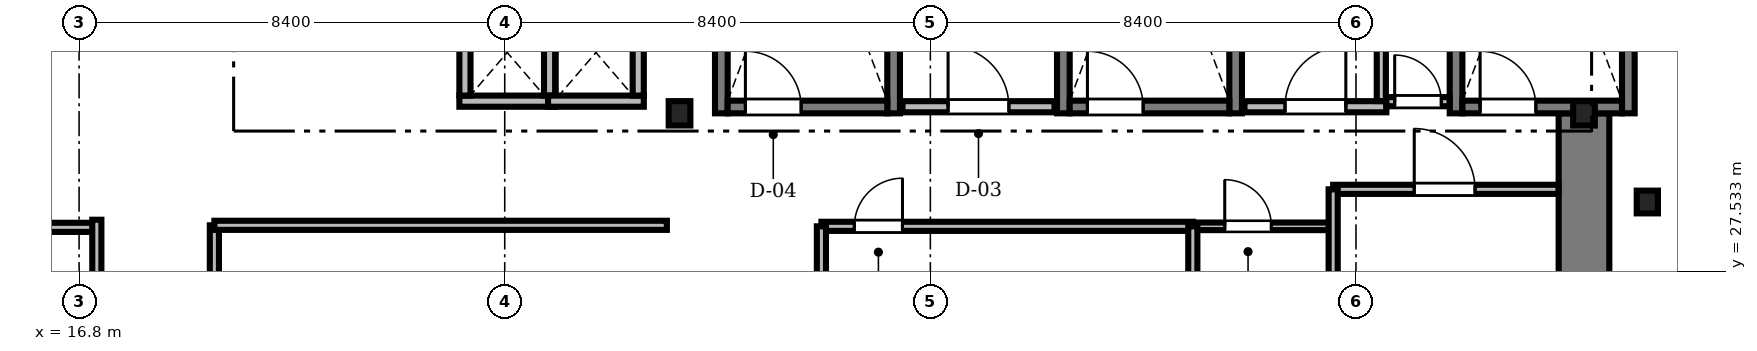
"""IFC4 building model, lengths in metres.
Left out: names, types, materials, properties, quantities, classifications, styles, units other than length and angle.
Written with IfcOpenShell. Run it as: python <this file> out.ifc"""

import sys

from ifc_helpers import new_model, si_unit, direction, frame, frame_2d, origin, origin_2d, place, context, subcontext, project, spatial, rectangle, i_section, extrude, source, transform, mapped, element, fill, save


model = new_model("IFC4")
c1 = context("Model", 3, precision=1e-05, world=origin(), true_north=direction((0.0, 1.0)))
c2 = subcontext(c1, "Body", "Model", "MODEL_VIEW")
j1 = project(units=[si_unit("LENGTHUNIT", "METRE"), si_unit("PLANEANGLEUNIT", "RADIAN")], contexts=[c1])
p1 = place(None, origin())
s1 = spatial("IfcSite", under=j1, at=p1, CompositionType="ELEMENT")
p2 = place(p1, origin())
s2 = spatial("IfcBuilding", under=s1, at=p2, CompositionType="ELEMENT")
p3 = place(p2, frame((0.0, 0.0, 82.35)))
s3 = spatial("IfcBuildingStorey", under=s2, at=p3, CompositionType="ELEMENT", Elevation=82.35)
m1 = source(origin(), c2, "Body", "SweptSolid", [
    extrude(rectangle(XDim=13.15, YDim=1.0, at=frame_2d((6.575, 0.0))), origin(), (0.0, 0.0, 1.0), 3.41),
])
p4 = place(p3, frame((46.5, 17.5, 0.0), z_axis=(0.0, 0.0, 1.0), x_axis=(0.0, 1.0, 0.0)))
e1 = element("IfcWall", 1, at=p4, inside=s3, PredefinedType="SHEAR", context=c2, shape_type="MappedRepresentation", body=[
    mapped(m1, transform((0.0, 0.0, 0.0), scale=1.0)),
])
m2 = source(origin(), c2, "Body", "SweptSolid", [
    extrude(i_section(OverallWidth=0.428, OverallDepth=0.481, WebThickness=0.04, FlangeThickness=0.063, FilletRadius=0.015, at=origin_2d()), origin(), (0.0, 0.0, 1.0), 3.41),
])
for number, where, z_axis, x_axis in (
    (2, (28.65, 30.65, 0.0), (0.0, 0.0, 1.0), (1.0, 0.0, 0.0)),
    (3, (46.5, 30.65, 0.0), (0.0, 0.0, 1.0), (1.0, 0.0, 0.0)),
):
    element("IfcColumn", number, at=place(p3, frame(where, z_axis=z_axis, x_axis=x_axis)), inside=s3, PredefinedType="COLUMN", context=c2, shape_type="MappedRepresentation", body=[
        mapped(m2, transform((0.0, 0.0, 0.0), scale=1.0)),
    ])
m3 = source(origin(), c2, "Body", "SweptSolid", [
    extrude(i_section(OverallWidth=0.419, OverallDepth=0.449, WebThickness=0.031, FlangeThickness=0.048, FilletRadius=0.015, at=origin_2d()), origin(), (0.0, 0.0, 1.0), 3.41),
])
p5 = place(p3, frame((47.75, 28.9, 0.0), z_axis=(0.0, 0.0, 1.0), x_axis=(1.0, 0.0, 0.0)))
e4 = element("IfcColumn", 4, at=p5, inside=s3, PredefinedType="COLUMN", context=c2, shape_type="MappedRepresentation", body=[
    mapped(m3, transform((0.0, 0.0, 0.0), scale=1.0)),
])
m4 = source(origin(), c2, "Body", "SweptSolid", [
    extrude(rectangle(XDim=9.15, YDim=0.25, at=frame_2d((4.575, 0.0))), origin(), (0.0, 0.0, 1.0), 3.45),
])
for number, where, z_axis, x_axis in (
    (5, (29.475, 30.65, 0.0), (0.0, 0.0, 1.0), (0.0, 1.0, 0.0)),
    (6, (32.875, 30.65, 0.0), (0.0, 0.0, 1.0), (0.0, 1.0, 0.0)),
):
    element("IfcWall", number, at=place(p3, frame(where, z_axis=z_axis, x_axis=x_axis)), inside=s3, PredefinedType="SOLIDWALL", context=c2, shape_type="MappedRepresentation", body=[
        mapped(m4, transform((0.0, 0.0, 0.0), scale=1.0)),
    ])
m5 = source(origin(), c2, "Body", "SweptSolid", [
    extrude(rectangle(XDim=3.15, YDim=0.25, at=frame_2d((1.575, 0.0))), origin(), (0.0, 0.0, 1.0), 3.45),
])
p6 = place(p3, frame((29.6, 30.775, 0.0), z_axis=(0.0, 0.0, 1.0), x_axis=(1.0, 0.0, 0.0)))
e7 = element("IfcWall", 7, at=p6, inside=s3, PredefinedType="SOLIDWALL", context=c2, shape_type="MappedRepresentation", body=[
    mapped(m5, transform((0.0, 0.0, 0.0), scale=1.0)),
])
m6 = source(origin(), c2, "Body", "SweptSolid", [
    extrude(rectangle(XDim=1.1, YDim=2.2, at=frame_2d((0.55, 1.1))), frame((0.0, 0.135, 0.0), z_axis=(0.0, -1.0, 0.0), x_axis=(1.0, 0.0, 0.0)), (0.0, 0.0, 1.0), 0.27),
])
p7 = place(p6, frame((0.35, 0.0, 0.0)))
e8 = element("IfcOpeningElement", 8, at=p7, cuts=e7, PredefinedType="OPENING", context=c2, shape_type="MappedRepresentation", body=[
    mapped(m6, transform((0.0, 0.0, 0.0), scale=1.0)),
])
for number, where, z_axis, x_axis in (
    (9, (36.225, 30.65, 0.0), (0.0, 0.0, 1.0), (0.0, 1.0, 0.0)),
    (10, (39.625, 30.65, 0.0), (0.0, 0.0, 1.0), (0.0, 1.0, 0.0)),
):
    element("IfcWall", number, at=place(p3, frame(where, z_axis=z_axis, x_axis=x_axis)), inside=s3, PredefinedType="SOLIDWALL", context=c2, shape_type="MappedRepresentation", body=[
        mapped(m4, transform((0.0, 0.0, 0.0), scale=1.0)),
    ])
p8 = place(p3, frame((36.35, 30.775, 0.0), z_axis=(0.0, 0.0, 1.0), x_axis=(1.0, 0.0, 0.0)))
e11 = element("IfcWall", 11, at=p8, inside=s3, PredefinedType="SOLIDWALL", context=c2, shape_type="MappedRepresentation", body=[
    mapped(m5, transform((0.0, 0.0, 0.0), scale=1.0)),
])
p9 = place(p8, frame((0.35, 0.0, 0.0)))
e12 = element("IfcOpeningElement", 12, at=p9, cuts=e11, PredefinedType="OPENING", context=c2, shape_type="MappedRepresentation", body=[
    mapped(m6, transform((0.0, 0.0, 0.0), scale=1.0)),
])
for number, where, z_axis, x_axis in (
    (13, (43.975, 30.65, 0.0), (0.0, 0.0, 1.0), (0.0, 1.0, 0.0)),
    (14, (47.375, 30.65, 0.0), (0.0, 0.0, 1.0), (0.0, 1.0, 0.0)),
):
    element("IfcWall", number, at=place(p3, frame(where, z_axis=z_axis, x_axis=x_axis)), inside=s3, PredefinedType="SOLIDWALL", context=c2, shape_type="MappedRepresentation", body=[
        mapped(m4, transform((0.0, 0.0, 0.0), scale=1.0)),
    ])
p10 = place(p3, frame((44.1, 30.775, 0.0), z_axis=(0.0, 0.0, 1.0), x_axis=(1.0, 0.0, 0.0)))
e15 = element("IfcWall", 15, at=p10, inside=s3, PredefinedType="SOLIDWALL", context=c2, shape_type="MappedRepresentation", body=[
    mapped(m5, transform((0.0, 0.0, 0.0), scale=1.0)),
])
p11 = place(p10, frame((0.35, 0.0, 0.0)))
e16 = element("IfcOpeningElement", 16, at=p11, cuts=e15, PredefinedType="OPENING", context=c2, shape_type="MappedRepresentation", body=[
    mapped(m6, transform((0.0, 0.0, 0.0), scale=1.0)),
])
m7 = source(origin(), c2, "Body", "SweptSolid", [
    extrude(rectangle(XDim=3.0, YDim=0.22, at=frame_2d((1.5, 0.0))), origin(), (0.0, 0.0, 1.0), 3.41),
])
p12 = place(p3, frame((33.05, 30.78, 0.0), z_axis=(0.0, 0.0, 1.0), x_axis=(1.0, 0.0, 0.0)))
e17 = element("IfcWall", 17, at=p12, inside=s3, PredefinedType="SOLIDWALL", context=c2, shape_type="MappedRepresentation", body=[
    mapped(m7, transform((0.0, 0.0, 0.0), scale=1.0)),
])
m8 = source(origin(), c2, "Body", "SweptSolid", [
    extrude(rectangle(XDim=1.2, YDim=2.2, at=frame_2d((0.6, 1.1))), frame((0.0, 0.12, 0.0), z_axis=(0.0, -1.0, 0.0), x_axis=(1.0, 0.0, 0.0)), (0.0, 0.0, 1.0), 0.24),
])
p13 = place(p12, frame((0.9, 0.0, 0.0)))
e18 = element("IfcOpeningElement", 18, at=p13, cuts=e17, PredefinedType="OPENING", context=c2, shape_type="MappedRepresentation", body=[
    mapped(m8, transform((0.0, 0.0, 0.0), scale=1.0)),
])
m9 = source(origin(), c2, "Body", "SweptSolid", [
    extrude(rectangle(XDim=2.8, YDim=0.22, at=frame_2d((1.4, 0.0))), origin(), (0.0, 0.0, 1.0), 3.41),
])
p14 = place(p3, frame((39.8, 30.78, 0.0), z_axis=(0.0, 0.0, 1.0), x_axis=(1.0, 0.0, 0.0)))
e19 = element("IfcWall", 19, at=p14, inside=s3, PredefinedType="SOLIDWALL", context=c2, shape_type="MappedRepresentation", body=[
    mapped(m9, transform((0.0, 0.0, 0.0), scale=1.0)),
])
p15 = place(p14, frame((0.8, 0.0, 0.0)))
e20 = element("IfcOpeningElement", 20, at=p15, cuts=e19, PredefinedType="OPENING", context=c2, shape_type="MappedRepresentation", body=[
    mapped(m8, transform((0.0, 0.0, 0.0), scale=1.0)),
])
m10 = source(origin(), c2, "Body", "SweptSolid", [
    extrude(rectangle(XDim=1.89, YDim=0.22, at=frame_2d((0.945, 0.0))), origin(), (0.0, 0.0, 1.0), 3.41),
])
p16 = place(p3, frame((24.305, 30.89, 0.0), z_axis=(0.0, 0.0, 1.0), x_axis=(1.0, 0.0, 0.0)))
e21 = element("IfcWall", 21, at=p16, inside=s3, PredefinedType="SOLIDWALL", context=c2, shape_type="MappedRepresentation", body=[
    mapped(m10, transform((0.0, 0.0, 0.0), scale=1.0)),
])
m11 = source(origin(), c2, "Body", "SweptSolid", [
    extrude(rectangle(XDim=1.7, YDim=0.22, at=frame_2d((0.85, 0.0))), origin(), (0.0, 0.0, 1.0), 3.41),
])
for number, where, z_axis, x_axis in (
    (22, (24.415, 31.0, 0.0), (0.0, 0.0, 1.0), (0.0, 1.0, 0.0)),
    (23, (26.085, 31.0, 0.0), (0.0, 0.0, 1.0), (0.0, 1.0, 0.0)),
):
    element("IfcWall", number, at=place(p3, frame(where, z_axis=z_axis, x_axis=x_axis)), inside=s3, PredefinedType="SOLIDWALL", context=c2, shape_type="MappedRepresentation", body=[
        mapped(m11, transform((0.0, 0.0, 0.0), scale=1.0)),
    ])
p17 = place(p3, frame((26.055, 30.89, 0.0), z_axis=(0.0, 0.0, 1.0), x_axis=(1.0, 0.0, 0.0)))
e24 = element("IfcWall", 24, at=p17, inside=s3, PredefinedType="SOLIDWALL", context=c2, shape_type="MappedRepresentation", body=[
    mapped(m10, transform((0.0, 0.0, 0.0), scale=1.0)),
])
p18 = place(p3, frame((27.835, 31.0, 0.0), z_axis=(0.0, 0.0, 1.0), x_axis=(0.0, 1.0, 0.0)))
e25 = element("IfcWall", 25, at=p18, inside=s3, PredefinedType="SOLIDWALL", context=c2, shape_type="MappedRepresentation", body=[
    mapped(m11, transform((0.0, 0.0, 0.0), scale=1.0)),
])
m12 = source(origin(), c2, "Body", "SweptSolid", [
    extrude(rectangle(XDim=11.94, YDim=0.18, at=frame_2d((5.97, 0.0))), origin(), (0.0, 0.0, 1.0), 2.802),
])
p19 = place(p3, frame((19.47, 16.5, 0.0), z_axis=(0.0, 0.0, 1.0), x_axis=(0.0, 1.0, 0.0)))
e26 = element("IfcWall", 26, at=p19, inside=s3, PredefinedType="PARTITIONING", context=c2, shape_type="MappedRepresentation", body=[
    mapped(m12, transform((0.0, 0.0, 0.0), scale=1.0)),
])
m13 = source(origin(), c2, "Body", "SweptSolid", [
    extrude(rectangle(XDim=1.05, YDim=2.2, at=frame_2d((0.525, 1.1))), frame((0.0, 0.1, 0.0), z_axis=(0.0, -1.0, 0.0), x_axis=(1.0, 0.0, 0.0)), (0.0, 0.0, 1.0), 0.2),
])
p20 = place(p19, frame((4.5, 0.0, 0.0)))
e27 = element("IfcOpeningElement", 27, at=p20, cuts=e26, PredefinedType="OPENING", context=c2, shape_type="MappedRepresentation", body=[
    mapped(m13, transform((0.0, 0.0, 0.0), scale=1.0)),
])
m14 = source(origin(), c2, "Body", "SweptSolid", [
    extrude(rectangle(XDim=7.33, YDim=0.18, at=frame_2d((3.665, 0.0))), origin(), (0.0, 0.0, 1.0), 3.042),
])
p21 = place(p3, frame((31.45, 28.42, 0.0), z_axis=(0.0, 0.0, 1.0), x_axis=(1.0, 0.0, 0.0)))
e28 = element("IfcWall", 28, at=p21, inside=s3, PredefinedType="PARTITIONING", context=c2, shape_type="MappedRepresentation", body=[
    mapped(m14, transform((0.0, 0.0, 0.0), scale=1.0)),
])
m15 = source(origin(), c2, "Body", "SweptSolid", [
    extrude(rectangle(XDim=0.95, YDim=2.15, at=frame_2d((0.475, 1.075))), frame((0.0, 0.1, 0.0), z_axis=(0.0, -1.0, 0.0), x_axis=(1.0, 0.0, 0.0)), (0.0, 0.0, 1.0), 0.2),
])
p22 = place(p21, frame((0.65, 0.0, 0.0)))
e29 = element("IfcOpeningElement", 29, at=p22, cuts=e28, PredefinedType="OPENING", context=c2, shape_type="MappedRepresentation", body=[
    mapped(m15, transform((0.0, 0.0, 0.0), scale=1.0)),
])
m16 = source(origin(), c2, "Body", "SweptSolid", [
    extrude(rectangle(XDim=4.448, YDim=0.18, at=frame_2d((2.224, 0.0))), origin(), (0.0, 0.0, 1.0), 3.042),
])
p23 = place(p3, frame((41.55, 29.15, 0.0), z_axis=(0.0, 0.0, 1.0), x_axis=(1.0, 0.0, 0.0)))
e30 = element("IfcWall", 30, at=p23, inside=s3, PredefinedType="PARTITIONING", context=c2, shape_type="MappedRepresentation", body=[
    mapped(m16, transform((0.0, 0.0, 0.0), scale=1.0)),
])
m17 = source(origin(), c2, "Body", "SweptSolid", [
    extrude(rectangle(XDim=1.2, YDim=2.2, at=frame_2d((0.6, 1.1))), frame((0.0, 0.1, 0.0), z_axis=(0.0, -1.0, 0.0), x_axis=(1.0, 0.0, 0.0)), (0.0, 0.0, 1.0), 0.2),
])
p24 = place(p23, frame((1.6, 0.0, 0.0)))
e31 = element("IfcOpeningElement", 31, at=p24, cuts=e30, PredefinedType="OPENING", context=c2, shape_type="MappedRepresentation", body=[
    mapped(m17, transform((0.0, 0.0, 0.0), scale=1.0)),
])
m18 = source(origin(), c2, "Body", "SweptSolid", [
    extrude(rectangle(XDim=2.74, YDim=0.15, at=frame_2d((1.37, 0.0))), origin(), (0.0, 0.0, 1.0), 3.41),
])
p25 = place(p3, frame((38.78, 28.42, 0.0), z_axis=(0.0, 0.0, 1.0), x_axis=(1.0, 0.0, 0.0)))
e32 = element("IfcWall", 32, at=p25, inside=s3, PredefinedType="PARTITIONING", context=c2, shape_type="MappedRepresentation", body=[
    mapped(m18, transform((0.0, 0.0, 0.0), scale=1.0)),
])
m19 = source(origin(), c2, "Body", "SweptSolid", [
    extrude(rectangle(XDim=0.92, YDim=2.1, at=frame_2d((0.46, 1.05))), frame((0.0, 0.085, 0.0), z_axis=(0.0, -1.0, 0.0), x_axis=(1.0, 0.0, 0.0)), (0.0, 0.0, 1.0), 0.17),
])
p26 = place(p25, frame((0.63, 0.0, 0.0)))
e33 = element("IfcOpeningElement", 33, at=p26, cuts=e32, PredefinedType="OPENING", context=c2, shape_type="MappedRepresentation", body=[
    mapped(m19, transform((0.0, 0.0, 0.0), scale=1.0)),
])
m20 = source(origin(), c2, "Body", "SweptSolid", [
    extrude(rectangle(XDim=1.248, YDim=0.18, at=frame_2d((0.624, 0.0))), origin(), (0.0, 0.0, 1.0), 3.41),
])
p27 = place(p3, frame((42.6, 30.88, 0.0), z_axis=(0.0, 0.0, 1.0), x_axis=(1.0, 0.0, 0.0)))
e34 = element("IfcWall", 34, at=p27, inside=s3, PredefinedType="PARTITIONING", context=c2, shape_type="MappedRepresentation", body=[
    mapped(m20, transform((0.0, 0.0, 0.0), scale=1.0)),
])
m21 = source(origin(), c2, "Body", "SweptSolid", [
    extrude(rectangle(XDim=0.92, YDim=2.1, at=frame_2d((0.46, 1.05))), frame((0.0, 0.1, 0.0), z_axis=(0.0, -1.0, 0.0), x_axis=(1.0, 0.0, 0.0)), (0.0, 0.0, 1.0), 0.2),
])
p28 = place(p27, frame((0.164, 0.0, 0.0)))
e35 = element("IfcOpeningElement", 35, at=p28, cuts=e34, PredefinedType="OPENING", context=c2, shape_type="MappedRepresentation", body=[
    mapped(m21, transform((0.0, 0.0, 0.0), scale=1.0)),
])
m22 = source(origin(), c2, "Body", "SweptSolid", [
    extrude(rectangle(XDim=14.92, YDim=0.18, at=frame_2d((7.46, 0.0))), origin(), (0.0, 0.0, 1.0), 2.652),
])
p29 = place(p3, frame((2.23, 28.4, 0.0), z_axis=(0.0, 0.0, 1.0), x_axis=(1.0, 0.0, 0.0)))
e36 = element("IfcWall", 36, at=p29, inside=s3, PredefinedType="PARTITIONING", context=c2, shape_type="MappedRepresentation", body=[
    mapped(m22, transform((0.0, 0.0, 0.0), scale=1.0)),
])
m23 = source(origin(), c2, "Body", "SweptSolid", [
    extrude(rectangle(XDim=13.74, YDim=0.18, at=frame_2d((6.87, 0.0))), origin(), (0.0, 0.0, 1.0), 2.802),
])
p30 = place(p3, frame((17.15, 14.81, 0.0), z_axis=(0.0, 0.0, 1.0), x_axis=(0.0, 1.0, 0.0)))
e37 = element("IfcWall", 37, at=p30, inside=s3, PredefinedType="PARTITIONING", context=c2, shape_type="MappedRepresentation", body=[
    mapped(m23, transform((0.0, 0.0, 0.0), scale=1.0)),
])
m24 = source(origin(), c2, "Body", "SweptSolid", [
    extrude(rectangle(XDim=8.93, YDim=0.18, at=frame_2d((4.465, 0.0))), origin(), (0.0, 0.0, 1.0), 3.41),
])
p31 = place(p3, frame((19.47, 28.44, 0.0), z_axis=(0.0, 0.0, 1.0), x_axis=(1.0, 0.0, 0.0)))
e38 = element("IfcWall", 38, at=p31, inside=s3, PredefinedType="PARTITIONING", context=c2, shape_type="MappedRepresentation", body=[
    mapped(m24, transform((0.0, 0.0, 0.0), scale=1.0)),
])
m25 = source(origin(), c2, "Body", "SweptSolid", [
    extrude(rectangle(XDim=2.758, YDim=0.18, at=frame_2d((1.379, 0.0))), origin(), (0.0, 0.0, 1.0), 3.41),
])
p32 = place(p3, frame((42.5, 30.892, 0.0), z_axis=(0.0, 0.0, 1.0), x_axis=(0.0, 1.0, 0.0)))
e39 = element("IfcWall", 39, at=p32, inside=s3, PredefinedType="PARTITIONING", context=c2, shape_type="MappedRepresentation", body=[
    mapped(m25, transform((0.0, 0.0, 0.0), scale=1.0)),
])
m26 = source(origin(), c2, "Body", "SweptSolid", [
    extrude(rectangle(XDim=2.35, YDim=0.18, at=frame_2d((1.175, 0.0))), origin(), (0.0, 0.0, 1.0), 2.802),
])
p33 = place(p3, frame((41.55, 26.8, 0.0), z_axis=(0.0, 0.0, 1.0), x_axis=(0.0, 1.0, 0.0)))
e40 = element("IfcWall", 40, at=p33, inside=s3, PredefinedType="PARTITIONING", context=c2, shape_type="MappedRepresentation", body=[
    mapped(m26, transform((0.0, 0.0, 0.0), scale=1.0)),
])
m27 = source(origin(), c2, "Body", "SweptSolid", [
    extrude(rectangle(XDim=1.6, YDim=0.18, at=frame_2d((0.8, 0.0))), origin(), (0.0, 0.0, 1.0), 2.952),
])
for number, where, z_axis, x_axis in (
    (41, (31.45, 26.82, 0.0), (0.0, 0.0, 1.0), (0.0, 1.0, 0.0)),
    (42, (38.78, 26.82, 0.0), (0.0, 0.0, 1.0), (0.0, 1.0, 0.0)),
):
    element("IfcWall", number, at=place(p3, frame(where, z_axis=z_axis, x_axis=x_axis)), inside=s3, PredefinedType="PARTITIONING", context=c2, shape_type="MappedRepresentation", body=[
        mapped(m27, transform((0.0, 0.0, 0.0), scale=1.0)),
    ])
m28 = source(origin(), c2, "Body", "SweptSolid", [
    extrude(rectangle(XDim=1.1, YDim=2.2, at=frame_2d((0.55, 1.1))), frame((0.0, 0.025, 0.0), z_axis=(0.0, -1.0, 0.0), x_axis=(1.0, 0.0, 0.0)), (0.0, 0.0, 1.0), 0.05),
])
p34 = place(p7, origin())
e43 = element("IfcDoor", 43, at=p34, inside=s3, OperationType="SINGLE_SWING_LEFT", PredefinedType="DOOR", context=c2, shape_type="MappedRepresentation", body=[
    mapped(m28, transform((0.0, 0.0, 0.0), scale=1.0)),
])
fill(e8, e43)
p35 = place(p9, origin())
e44 = element("IfcDoor", 44, at=p35, inside=s3, OperationType="SINGLE_SWING_LEFT", PredefinedType="DOOR", context=c2, shape_type="MappedRepresentation", body=[
    mapped(m28, transform((0.0, 0.0, 0.0), scale=1.0)),
])
fill(e12, e44)
p36 = place(p11, origin())
e45 = element("IfcDoor", 45, at=p36, inside=s3, OperationType="SINGLE_SWING_LEFT", PredefinedType="DOOR", context=c2, shape_type="MappedRepresentation", body=[
    mapped(m28, transform((0.0, 0.0, 0.0), scale=1.0)),
])
fill(e16, e45)
m29 = source(origin(), c2, "Body", "SweptSolid", [
    extrude(rectangle(XDim=1.2, YDim=2.2, at=frame_2d((0.6, 1.1))), frame((0.0, 0.025, 0.0), z_axis=(0.0, -1.0, 0.0), x_axis=(1.0, 0.0, 0.0)), (0.0, 0.0, 1.0), 0.05),
])
p37 = place(p13, origin())
e46 = element("IfcDoor", 46, at=p37, inside=s3, OperationType="SINGLE_SWING_LEFT", PredefinedType="DOOR", context=c2, shape_type="MappedRepresentation", body=[
    mapped(m29, transform((0.0, 0.0, 0.0), scale=1.0)),
])
fill(e18, e46)
p38 = place(p15, origin())
e47 = element("IfcDoor", 47, at=p38, inside=s3, OperationType="SINGLE_SWING_RIGHT", PredefinedType="DOOR", context=c2, shape_type="MappedRepresentation", body=[
    mapped(m29, transform((0.0, 0.0, 0.0), scale=1.0)),
])
fill(e20, e47)
m30 = source(origin(), c2, "Body", "SweptSolid", [
    extrude(rectangle(XDim=0.95, YDim=2.15, at=frame_2d((0.475, 1.075))), frame((0.0, 0.025, 0.0), z_axis=(0.0, -1.0, 0.0), x_axis=(1.0, 0.0, 0.0)), (0.0, 0.0, 1.0), 0.05),
])
p39 = place(p22, origin())
e48 = element("IfcDoor", 48, at=p39, inside=s3, OperationType="SINGLE_SWING_RIGHT", PredefinedType="DOOR", context=c2, shape_type="MappedRepresentation", body=[
    mapped(m30, transform((0.0, 0.0, 0.0), scale=1.0)),
])
fill(e29, e48)
p40 = place(p24, origin())
e49 = element("IfcDoor", 49, at=p40, inside=s3, OperationType="SINGLE_SWING_LEFT", PredefinedType="DOOR", context=c2, shape_type="MappedRepresentation", body=[
    mapped(m29, transform((0.0, 0.0, 0.0), scale=1.0)),
])
fill(e31, e49)
m31 = source(origin(), c2, "Body", "SweptSolid", [
    extrude(rectangle(XDim=0.92, YDim=2.1, at=frame_2d((0.46, 1.05))), frame((0.0, 0.025, 0.0), z_axis=(0.0, -1.0, 0.0), x_axis=(1.0, 0.0, 0.0)), (0.0, 0.0, 1.0), 0.05),
])
p41 = place(p26, origin())
e50 = element("IfcDoor", 50, at=p41, inside=s3, OperationType="SINGLE_SWING_LEFT", PredefinedType="DOOR", context=c2, shape_type="MappedRepresentation", body=[
    mapped(m31, transform((0.0, 0.0, 0.0), scale=1.0)),
])
fill(e33, e50)
p42 = place(p28, origin())
e51 = element("IfcDoor", 51, at=p42, inside=s3, OperationType="SINGLE_SWING_LEFT", PredefinedType="DOOR", context=c2, shape_type="MappedRepresentation", body=[
    mapped(m31, transform((0.0, 0.0, 0.0), scale=1.0)),
])
fill(e35, e51)
save(model, sys.argv[1])
